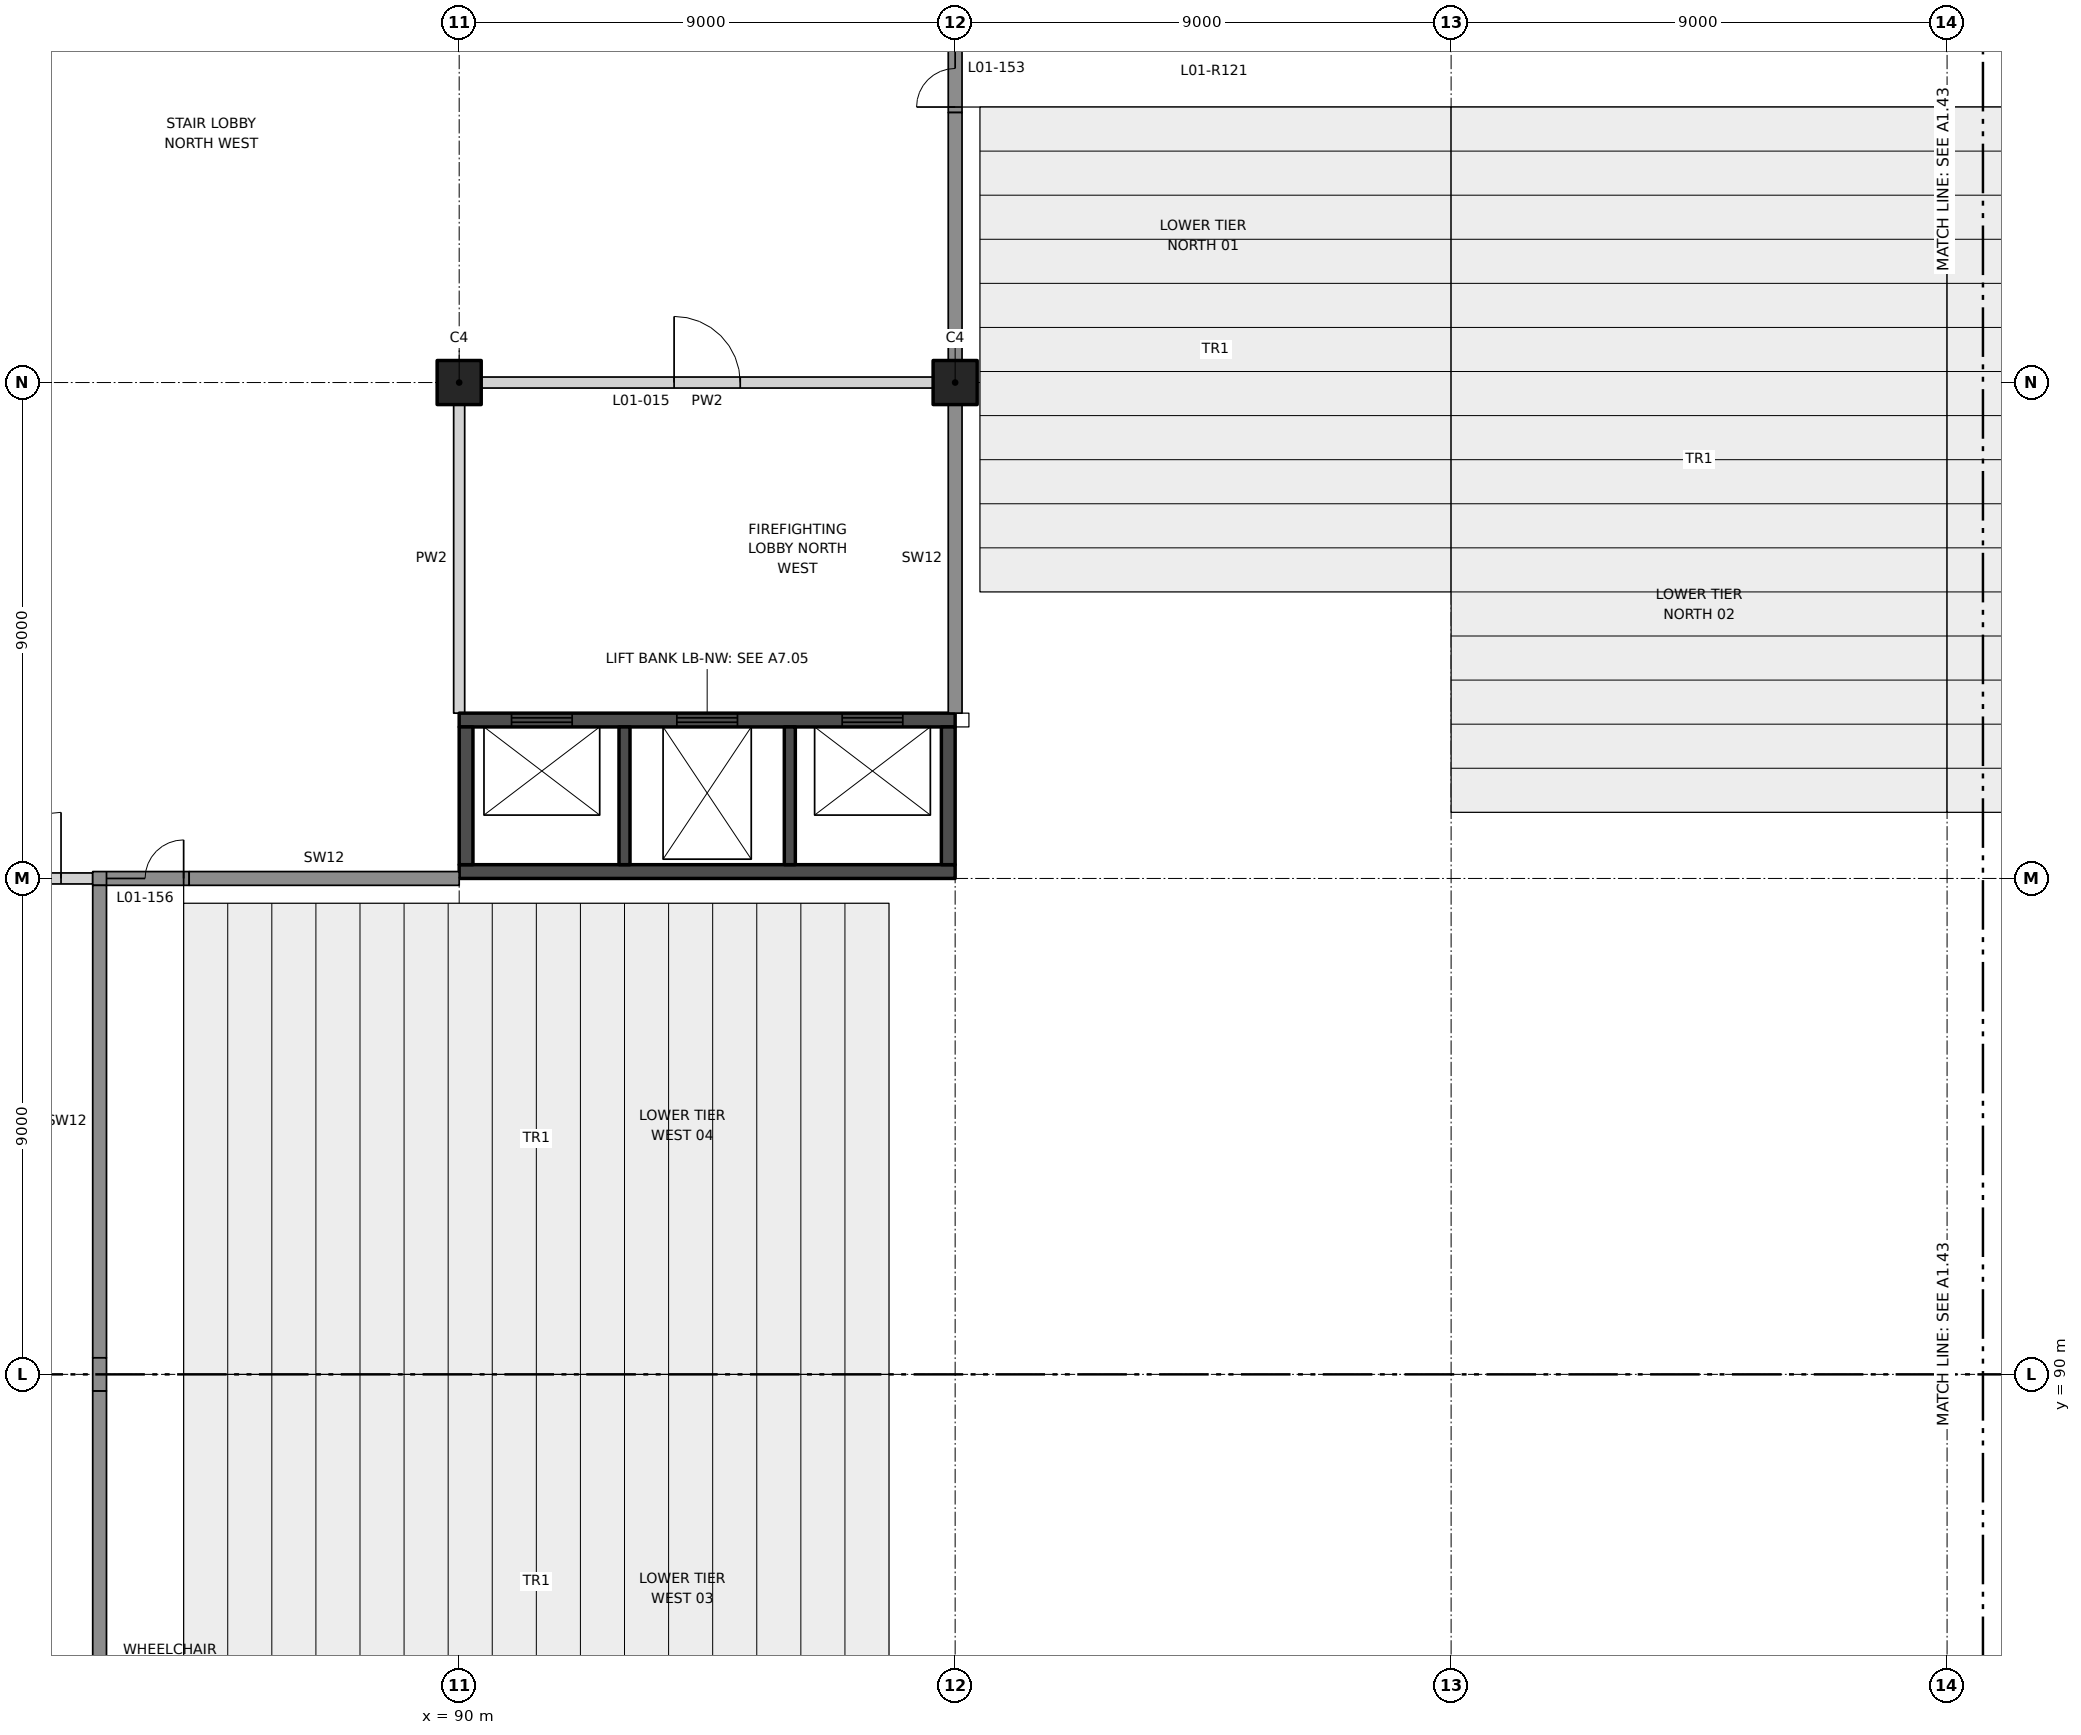
"""IFC4 building model, lengths in metres.
Left out: names, types, materials, properties, quantities, classifications, styles, units other than length and angle.
Written with IfcOpenShell. Run it as: python <this file> out.ifc"""

import sys

from ifc_helpers import new_model, si_unit, direction, frame, frame_2d, origin, origin_2d, place, context, subcontext, project, spatial, rectangle, extrude, element, fill, save


model = new_model("IFC4")
c1 = context("Model", 3, precision=1e-05, world=origin(), true_north=direction((0.0, 1.0)))
c2 = subcontext(c1, "Body", "Model", "MODEL_VIEW")
j1 = project(units=[si_unit("LENGTHUNIT", "METRE"), si_unit("PLANEANGLEUNIT", "RADIAN")], contexts=[c1])
p1 = place(None, origin())
s1 = spatial("IfcSite", under=j1, at=p1, CompositionType="ELEMENT")
p2 = place(p1, origin())
s2 = spatial("IfcBuilding", under=s1, at=p2, CompositionType="ELEMENT")
p3 = place(p2, frame((0.0, 0.0, 7.0)))
s3 = spatial("IfcBuildingStorey", under=s2, at=p3, CompositionType="ELEMENT", Elevation=7.0)
for number, where, z_axis, x_axis in (
    (1, (90.0, 108.0, 0.0), (0.0, 0.0, 1.0), (1.0, 0.0, 0.0)),
    (2, (99.0, 108.0, 0.0), (0.0, 0.0, 1.0), (1.0, 0.0, 0.0)),
):
    element("IfcColumn", number, at=place(p3, frame(where, z_axis=z_axis, x_axis=x_axis)), inside=s3, PredefinedType="COLUMN", context=c2, shape_type="SweptSolid", body=[
        extrude(rectangle(XDim=0.8, YDim=0.8, at=origin_2d()), origin(), (0.0, 0.0, 1.0), 4.5),
    ])
p4 = place(p3, frame((81.0, 99.0, 0.0), z_axis=(0.0, 0.0, 1.0), x_axis=(1.0, 0.0, 0.0)))
e3 = element("IfcWall", 3, at=p4, inside=s3, PredefinedType="PARTITIONING", context=c2, shape_type="SweptSolid", body=[
    extrude(rectangle(XDim=2.35, YDim=0.2, at=frame_2d((1.175, 0.0))), origin(), (0.0, 0.0, 1.0), 3.15),
])
p5 = place(p4, frame((0.575, 0.0, 0.0)))
e4 = element("IfcOpeningElement", 4, at=p5, cuts=e3, PredefinedType="OPENING", context=c2, shape_type="SweptSolid", body=[
    extrude(rectangle(XDim=1.2, YDim=2.1, at=frame_2d((0.6, 1.05))), frame((0.0, 0.11, 0.0), z_axis=(0.0, -1.0, 0.0), x_axis=(1.0, 0.0, 0.0)), (0.0, 0.0, 1.0), 0.22),
])
p6 = place(p3, frame((90.4, 108.0, 0.0), z_axis=(0.0, 0.0, 1.0), x_axis=(1.0, 0.0, 0.0)))
e5 = element("IfcWall", 5, at=p6, inside=s3, PredefinedType="PARTITIONING", context=c2, shape_type="SweptSolid", body=[
    extrude(rectangle(XDim=8.2, YDim=0.2, at=frame_2d((4.1, 0.0))), origin(), (0.0, 0.0, 1.0), 3.25),
])
p7 = place(p6, frame((3.5, 0.0, 0.0)))
e6 = element("IfcOpeningElement", 6, at=p7, cuts=e5, PredefinedType="OPENING", context=c2, shape_type="SweptSolid", body=[
    extrude(rectangle(XDim=1.2, YDim=2.1, at=frame_2d((0.6, 1.05))), frame((0.0, 0.11, 0.0), z_axis=(0.0, -1.0, 0.0), x_axis=(1.0, 0.0, 0.0)), (0.0, 0.0, 1.0), 0.22),
])
p8 = place(p3, frame((90.0, 102.0, 0.0), z_axis=(0.0, 0.0, 1.0), x_axis=(0.0, 1.0, 0.0)))
e7 = element("IfcWall", 7, at=p8, inside=s3, PredefinedType="PARTITIONING", context=c2, shape_type="SweptSolid", body=[
    extrude(rectangle(XDim=5.6, YDim=0.2, at=frame_2d((2.8, 0.0))), origin(), (0.0, 0.0, 1.0), 3.45),
])
p9 = place(p3, frame((90.0, 101.875, 0.0), z_axis=(0.0, 0.0, 1.0), x_axis=(1.0, 0.0, 0.0)))
e8 = element("IfcWall", 8, at=p9, inside=s3, PredefinedType="SHEAR", context=c2, shape_type="SweptSolid", body=[
    extrude(rectangle(XDim=9.0, YDim=0.25, at=frame_2d((4.5, 0.0))), origin(), (0.0, 0.0, 1.0), 4.5),
])
p10 = place(p9, frame((0.95, 0.0, 0.0)))
e9 = element("IfcOpeningElement", 9, at=p10, cuts=e8, PredefinedType="OPENING", context=c2, shape_type="SweptSolid", body=[
    extrude(rectangle(XDim=1.1, YDim=2.1, at=frame_2d((0.55, 1.05))), frame((0.0, 0.135, 0.0), z_axis=(0.0, -1.0, 0.0), x_axis=(1.0, 0.0, 0.0)), (0.0, 0.0, 1.0), 0.27),
])
p11 = place(p9, frame((3.95, 0.0, 0.0)))
e10 = element("IfcOpeningElement", 10, at=p11, cuts=e8, PredefinedType="OPENING", context=c2, shape_type="SweptSolid", body=[
    extrude(rectangle(XDim=1.1, YDim=2.1, at=frame_2d((0.55, 1.05))), frame((0.0, 0.135, 0.0), z_axis=(0.0, -1.0, 0.0), x_axis=(1.0, 0.0, 0.0)), (0.0, 0.0, 1.0), 0.27),
])
p12 = place(p9, frame((6.95, 0.0, 0.0)))
e11 = element("IfcOpeningElement", 11, at=p12, cuts=e8, PredefinedType="OPENING", context=c2, shape_type="SweptSolid", body=[
    extrude(rectangle(XDim=1.1, YDim=2.1, at=frame_2d((0.55, 1.05))), frame((0.0, 0.135, 0.0), z_axis=(0.0, -1.0, 0.0), x_axis=(1.0, 0.0, 0.0)), (0.0, 0.0, 1.0), 0.27),
])
p13 = place(p3, frame((90.0, 99.125, 0.0), z_axis=(0.0, 0.0, 1.0), x_axis=(1.0, 0.0, 0.0)))
e12 = element("IfcWall", 12, at=p13, inside=s3, PredefinedType="SHEAR", context=c2, shape_type="SweptSolid", body=[
    extrude(rectangle(XDim=9.0, YDim=0.25, at=frame_2d((4.5, 0.0))), origin(), (0.0, 0.0, 1.0), 4.5),
])
for number, where, z_axis, x_axis in (
    (13, (90.125, 99.25, 0.0), (0.0, 0.0, 1.0), (0.0, 1.0, 0.0)),
    (14, (98.875, 99.25, 0.0), (0.0, 0.0, 1.0), (0.0, 1.0, 0.0)),
):
    element("IfcWall", number, at=place(p3, frame(where, z_axis=z_axis, x_axis=x_axis)), inside=s3, PredefinedType="SHEAR", context=c2, shape_type="SweptSolid", body=[
        extrude(rectangle(XDim=2.5, YDim=0.25, at=frame_2d((1.25, 0.0))), origin(), (0.0, 0.0, 1.0), 4.5),
    ])
for number, where, z_axis, x_axis in (
    (15, (93.0, 99.25, 0.0), (0.0, 0.0, 1.0), (0.0, 1.0, 0.0)),
    (16, (96.0, 99.25, 0.0), (0.0, 0.0, 1.0), (0.0, 1.0, 0.0)),
):
    element("IfcWall", number, at=place(p3, frame(where, z_axis=z_axis, x_axis=x_axis)), inside=s3, PredefinedType="SHEAR", context=c2, shape_type="SweptSolid", body=[
        extrude(rectangle(XDim=2.5, YDim=0.2, at=frame_2d((1.25, 0.0))), origin(), (0.0, 0.0, 1.0), 4.5),
    ])
p14 = place(p3, frame((99.0, 112.9, 0.0), z_axis=(0.0, 0.0, 1.0), x_axis=(0.0, 1.0, 0.0)))
e17 = element("IfcWall", 17, at=p14, inside=s3, PredefinedType="SOLIDWALL", context=c2, shape_type="SweptSolid", body=[
    extrude(rectangle(XDim=1.75, YDim=0.25, at=frame_2d((0.875, 0.0))), origin(), (0.0, 0.0, 1.0), 3.15),
])
p15 = place(p14, frame((0.1, 0.0, 0.0)))
e18 = element("IfcOpeningElement", 18, at=p15, cuts=e17, PredefinedType="OPENING", context=c2, shape_type="SweptSolid", body=[
    extrude(rectangle(XDim=1.4, YDim=2.4, at=frame_2d((0.7, 1.2))), frame((0.0, 0.135, 0.0), z_axis=(0.0, -1.0, 0.0), x_axis=(1.0, 0.0, 0.0)), (0.0, 0.0, 1.0), 0.27),
])
p16 = place(p3, frame((85.1, 99.0, 0.0), z_axis=(0.0, 0.0, 1.0), x_axis=(-1.0, 0.0, 0.0)))
e19 = element("IfcWall", 19, at=p16, inside=s3, PredefinedType="SOLIDWALL", context=c2, shape_type="SweptSolid", body=[
    extrude(rectangle(XDim=1.75, YDim=0.25, at=frame_2d((0.875, 0.0))), origin(), (0.0, 0.0, 1.0), 3.15),
])
p17 = place(p16, frame((0.1, 0.0, 0.0)))
e20 = element("IfcOpeningElement", 20, at=p17, cuts=e19, PredefinedType="OPENING", context=c2, shape_type="SweptSolid", body=[
    extrude(rectangle(XDim=1.4, YDim=2.4, at=frame_2d((0.7, 1.2))), frame((0.0, 0.135, 0.0), z_axis=(0.0, -1.0, 0.0), x_axis=(1.0, 0.0, 0.0)), (0.0, 0.0, 1.0), 0.27),
])
p18 = place(p3, frame((99.0, 102.0, 0.0), z_axis=(0.0, 0.0, 1.0), x_axis=(0.0, 1.0, 0.0)))
e21 = element("IfcWall", 21, at=p18, inside=s3, PredefinedType="SOLIDWALL", context=c2, shape_type="SweptSolid", body=[
    extrude(rectangle(XDim=5.6, YDim=0.25, at=frame_2d((2.8, 0.0))), origin(), (0.0, 0.0, 1.0), 3.45),
])
p19 = place(p3, frame((99.0, 108.4, 0.0), z_axis=(0.0, 0.0, 1.0), x_axis=(0.0, 1.0, 0.0)))
e22 = element("IfcWall", 22, at=p19, inside=s3, PredefinedType="SOLIDWALL", context=c2, shape_type="SweptSolid", body=[
    extrude(rectangle(XDim=4.5, YDim=0.25, at=frame_2d((2.25, 0.0))), origin(), (0.0, 0.0, 1.0), 3.15),
])
p20 = place(p3, frame((85.1, 99.0, 0.0), z_axis=(0.0, 0.0, 1.0), x_axis=(1.0, 0.0, 0.0)))
e23 = element("IfcWall", 23, at=p20, inside=s3, PredefinedType="SOLIDWALL", context=c2, shape_type="SweptSolid", body=[
    extrude(rectangle(XDim=4.9, YDim=0.25, at=frame_2d((2.45, 0.0))), origin(), (0.0, 0.0, 1.0), 3.15),
])
p21 = place(p3, frame((83.475, 90.3, 0.0), z_axis=(0.0, 0.0, 1.0), x_axis=(0.0, 1.0, 0.0)))
e24 = element("IfcWall", 24, at=p21, inside=s3, PredefinedType="SOLIDWALL", context=c2, shape_type="SweptSolid", body=[
    extrude(rectangle(XDim=8.575, YDim=0.25, at=frame_2d((4.288, 0.0))), origin(), (0.0, 0.0, 1.0), 3.15),
])
p22 = place(p3, frame((83.475, 82.8, 0.0), z_axis=(0.0, 0.0, 1.0), x_axis=(0.0, 1.0, 0.0)))
e25 = element("IfcWall", 25, at=p22, inside=s3, PredefinedType="SOLIDWALL", context=c2, shape_type="SweptSolid", body=[
    extrude(rectangle(XDim=6.9, YDim=0.25, at=frame_2d((3.45, 0.0))), origin(), (0.0, 0.0, 1.0), 3.15),
])
p23 = place(p3, frame((83.475, 89.7, 0.0), z_axis=(0.0, 0.0, 1.0), x_axis=(0.0, 1.0, 0.0)))
e26 = element("IfcWall", 26, at=p23, inside=s3, PredefinedType="SOLIDWALL", context=c2, shape_type="SweptSolid", body=[
    extrude(rectangle(XDim=0.6, YDim=0.25, at=frame_2d((0.3, 0.0))), origin(), (0.0, 0.0, 1.0), 4.15),
])
p24 = place(p7, origin())
e27 = element("IfcDoor", 27, at=p24, inside=s3, OperationType="SINGLE_SWING_LEFT", PredefinedType="DOOR", context=c2, shape_type="SweptSolid", body=[
    extrude(rectangle(XDim=1.2, YDim=2.1, at=frame_2d((0.6, 1.05))), frame((0.0, 0.025, 0.0), z_axis=(0.0, -1.0, 0.0), x_axis=(1.0, 0.0, 0.0)), (0.0, 0.0, 1.0), 0.05),
])
fill(e6, e27)
p25 = place(p5, origin())
e28 = element("IfcDoor", 28, at=p25, inside=s3, OperationType="SINGLE_SWING_RIGHT", PredefinedType="DOOR", context=c2, shape_type="SweptSolid", body=[
    extrude(rectangle(XDim=1.2, YDim=2.1, at=frame_2d((0.6, 1.05))), frame((0.0, 0.025, 0.0), z_axis=(0.0, -1.0, 0.0), x_axis=(1.0, 0.0, 0.0)), (0.0, 0.0, 1.0), 0.05),
])
fill(e4, e28)
p26 = place(p10, origin())
e29 = element("IfcDoor", 29, at=p26, inside=s3, OperationType="DOUBLE_DOOR_SLIDING", PredefinedType="DOOR", context=c2, shape_type="SweptSolid", body=[
    extrude(rectangle(XDim=1.1, YDim=2.1, at=frame_2d((0.55, 1.05))), frame((0.0, 0.025, 0.0), z_axis=(0.0, -1.0, 0.0), x_axis=(1.0, 0.0, 0.0)), (0.0, 0.0, 1.0), 0.05),
])
fill(e9, e29)
p27 = place(p11, origin())
e30 = element("IfcDoor", 30, at=p27, inside=s3, OperationType="DOUBLE_DOOR_SLIDING", PredefinedType="DOOR", context=c2, shape_type="SweptSolid", body=[
    extrude(rectangle(XDim=1.1, YDim=2.1, at=frame_2d((0.55, 1.05))), frame((0.0, 0.025, 0.0), z_axis=(0.0, -1.0, 0.0), x_axis=(1.0, 0.0, 0.0)), (0.0, 0.0, 1.0), 0.05),
])
fill(e10, e30)
p28 = place(p12, origin())
e31 = element("IfcDoor", 31, at=p28, inside=s3, OperationType="DOUBLE_DOOR_SLIDING", PredefinedType="DOOR", context=c2, shape_type="SweptSolid", body=[
    extrude(rectangle(XDim=1.1, YDim=2.1, at=frame_2d((0.55, 1.05))), frame((0.0, 0.025, 0.0), z_axis=(0.0, -1.0, 0.0), x_axis=(1.0, 0.0, 0.0)), (0.0, 0.0, 1.0), 0.05),
])
fill(e11, e31)
p29 = place(p15, origin())
e32 = element("IfcDoor", 32, at=p29, inside=s3, OperationType="DOUBLE_DOOR_SINGLE_SWING", PredefinedType="DOOR", context=c2, shape_type="SweptSolid", body=[
    extrude(rectangle(XDim=1.4, YDim=2.4, at=frame_2d((0.7, 1.2))), frame((0.0, 0.025, 0.0), z_axis=(0.0, -1.0, 0.0), x_axis=(1.0, 0.0, 0.0)), (0.0, 0.0, 1.0), 0.05),
])
fill(e18, e32)
p30 = place(p17, frame((1.4, 0.0, 0.0), z_axis=(0.0, 0.0, 1.0), x_axis=(-1.0, 0.0, 0.0)))
e33 = element("IfcDoor", 33, at=p30, inside=s3, OperationType="DOUBLE_DOOR_SINGLE_SWING", PredefinedType="DOOR", context=c2, shape_type="SweptSolid", body=[
    extrude(rectangle(XDim=1.4, YDim=2.4, at=frame_2d((0.7, 1.2))), frame((0.0, 0.025, 0.0), z_axis=(0.0, -1.0, 0.0), x_axis=(1.0, 0.0, 0.0)), (0.0, 0.0, 1.0), 0.05),
])
fill(e20, e33)
save(model, sys.argv[1])
